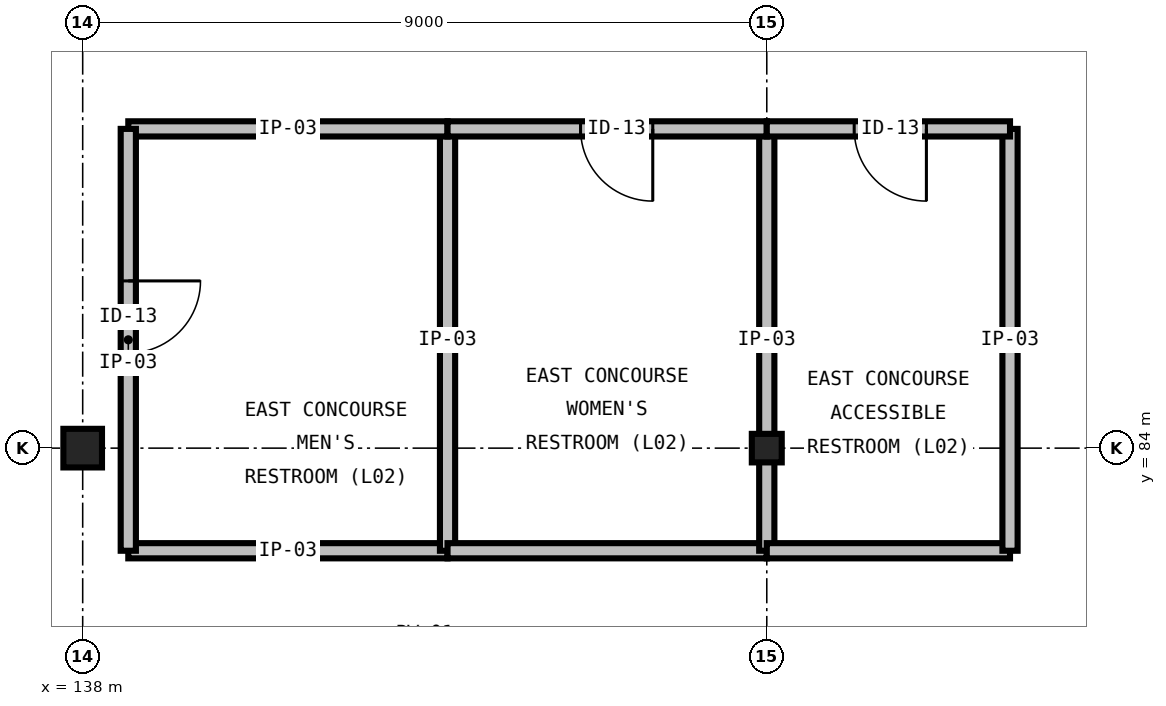
"""IFC4 building model, lengths in metres.
Left out: names, types, materials, properties, quantities, classifications, styles, units other than length and angle.
Written with IfcOpenShell. Run it as: python <this file> out.ifc"""

import sys

from ifc_helpers import new_model, si_unit, direction, frame, frame_2d, origin, origin_2d, place, context, subcontext, project, spatial, rectangle, hollow_rectangle, i_section, extrude, element, fill, save


model = new_model("IFC4")
c1 = context("Model", 3, precision=1e-05, world=origin(), true_north=direction((0.0, 1.0)))
c2 = subcontext(c1, "Body", "Model", "MODEL_VIEW")
j1 = project(units=[si_unit("LENGTHUNIT", "METRE"), si_unit("PLANEANGLEUNIT", "RADIAN")], contexts=[c1])
p1 = place(None, origin())
s1 = spatial("IfcSite", under=j1, at=p1, CompositionType="ELEMENT")
p2 = place(p1, origin())
s2 = spatial("IfcBuilding", under=s1, at=p2, CompositionType="ELEMENT")
p3 = place(p2, frame((0.0, 0.0, 12.0)))
s3 = spatial("IfcBuildingStorey", under=s2, at=p3, CompositionType="ELEMENT", Elevation=12.0)
p4 = place(p3, frame((138.0, 84.0, 0.0), z_axis=(0.0, 0.0, 1.0), x_axis=(1.0, 0.0, 0.0)))
e1 = element("IfcColumn", 1, at=p4, inside=s3, PredefinedType="COLUMN", context=c2, shape_type="SweptSolid", body=[
    extrude(hollow_rectangle(XDim=0.508, YDim=0.508, WallThickness=0.015, at=origin_2d()), origin(), (0.0, 0.0, 1.0), 6.0),
])
p5 = place(p3, frame((147.0, 84.0, 0.0), z_axis=(0.0, 0.0, 1.0), x_axis=(1.0, 0.0, 0.0)))
e2 = element("IfcColumn", 2, at=p5, inside=s3, PredefinedType="COLUMN", context=c2, shape_type="SweptSolid", body=[
    extrude(i_section(OverallWidth=0.394, OverallDepth=0.375, WebThickness=0.017, FlangeThickness=0.028, FilletRadius=0.031, at=origin_2d()), origin(), (0.0, 0.0, 1.0), 6.0),
])
p6 = place(p3, frame((138.6, 82.65, 0.0), z_axis=(0.0, 0.0, 1.0), x_axis=(1.0, 0.0, 0.0)))
e3 = element("IfcWall", 3, at=p6, inside=s3, PredefinedType="PARTITIONING", context=c2, shape_type="SweptSolid", body=[
    extrude(rectangle(XDim=4.2, YDim=0.2, at=frame_2d((2.1, 0.0))), origin(), (0.0, 0.0, 1.0), 5.65),
])
p7 = place(p3, frame((142.8, 82.65, 0.0), z_axis=(0.0, 0.0, 1.0), x_axis=(0.0, 1.0, 0.0)))
e4 = element("IfcWall", 4, at=p7, inside=s3, PredefinedType="PARTITIONING", context=c2, shape_type="SweptSolid", body=[
    extrude(rectangle(XDim=5.55, YDim=0.2, at=frame_2d((2.775, 0.0))), origin(), (0.0, 0.0, 1.0), 5.65),
])
p8 = place(p3, frame((142.8, 88.2, 0.0), z_axis=(0.0, 0.0, 1.0), x_axis=(-1.0, 0.0, 0.0)))
e5 = element("IfcWall", 5, at=p8, inside=s3, PredefinedType="PARTITIONING", context=c2, shape_type="SweptSolid", body=[
    extrude(rectangle(XDim=4.2, YDim=0.2, at=frame_2d((2.1, 0.0))), origin(), (0.0, 0.0, 1.0), 5.65),
])
p9 = place(p3, frame((138.6, 88.2, 0.0), z_axis=(0.0, 0.0, 1.0), x_axis=(0.0, -1.0, 0.0)))
e6 = element("IfcWall", 6, at=p9, inside=s3, PredefinedType="PARTITIONING", context=c2, shape_type="SweptSolid", body=[
    extrude(rectangle(XDim=5.55, YDim=0.2, at=frame_2d((2.775, 0.0))), origin(), (0.0, 0.0, 1.0), 5.65),
])
p10 = place(p9, frame((2.0, 0.0, 0.0)))
e7 = element("IfcOpeningElement", 7, at=p10, cuts=e6, PredefinedType="OPENING", context=c2, shape_type="SweptSolid", body=[
    extrude(rectangle(XDim=0.95, YDim=2.15, at=frame_2d((0.475, 1.075))), frame((0.0, 0.115, 0.0), z_axis=(0.0, -1.0, 0.0), x_axis=(1.0, 0.0, 0.0)), (0.0, 0.0, 1.0), 0.23),
])
p11 = place(p3, frame((142.8, 82.65, 0.0), z_axis=(0.0, 0.0, 1.0), x_axis=(1.0, 0.0, 0.0)))
e8 = element("IfcWall", 8, at=p11, inside=s3, PredefinedType="PARTITIONING", context=c2, shape_type="SweptSolid", body=[
    extrude(rectangle(XDim=4.2, YDim=0.2, at=frame_2d((2.1, 0.0))), origin(), (0.0, 0.0, 1.0), 5.65),
])
p12 = place(p3, frame((147.0, 82.65, 0.0), z_axis=(0.0, 0.0, 1.0), x_axis=(0.0, 1.0, 0.0)))
e9 = element("IfcWall", 9, at=p12, inside=s3, PredefinedType="PARTITIONING", context=c2, shape_type="SweptSolid", body=[
    extrude(rectangle(XDim=5.55, YDim=0.2, at=frame_2d((2.775, 0.0))), origin(), (0.0, 0.0, 1.0), 4.8),
])
p13 = place(p3, frame((147.0, 88.2, 0.0), z_axis=(0.0, 0.0, 1.0), x_axis=(-1.0, 0.0, 0.0)))
e10 = element("IfcWall", 10, at=p13, inside=s3, PredefinedType="PARTITIONING", context=c2, shape_type="SweptSolid", body=[
    extrude(rectangle(XDim=4.2, YDim=0.2, at=frame_2d((2.1, 0.0))), origin(), (0.0, 0.0, 1.0), 5.65),
])
p14 = place(p13, frame((1.5, 0.0, 0.0)))
e11 = element("IfcOpeningElement", 11, at=p14, cuts=e10, PredefinedType="OPENING", context=c2, shape_type="SweptSolid", body=[
    extrude(rectangle(XDim=0.95, YDim=2.15, at=frame_2d((0.475, 1.075))), frame((0.0, 0.115, 0.0), z_axis=(0.0, -1.0, 0.0), x_axis=(1.0, 0.0, 0.0)), (0.0, 0.0, 1.0), 0.23),
])
p15 = place(p3, frame((147.0, 82.65, 0.0), z_axis=(0.0, 0.0, 1.0), x_axis=(1.0, 0.0, 0.0)))
e12 = element("IfcWall", 12, at=p15, inside=s3, PredefinedType="PARTITIONING", context=c2, shape_type="SweptSolid", body=[
    extrude(rectangle(XDim=3.2, YDim=0.2, at=frame_2d((1.6, 0.0))), origin(), (0.0, 0.0, 1.0), 5.65),
])
p16 = place(p3, frame((150.2, 82.65, 0.0), z_axis=(0.0, 0.0, 1.0), x_axis=(0.0, 1.0, 0.0)))
e13 = element("IfcWall", 13, at=p16, inside=s3, PredefinedType="PARTITIONING", context=c2, shape_type="SweptSolid", body=[
    extrude(rectangle(XDim=5.55, YDim=0.2, at=frame_2d((2.775, 0.0))), origin(), (0.0, 0.0, 1.0), 5.65),
])
p17 = place(p3, frame((150.2, 88.2, 0.0), z_axis=(0.0, 0.0, 1.0), x_axis=(-1.0, 0.0, 0.0)))
e14 = element("IfcWall", 14, at=p17, inside=s3, PredefinedType="PARTITIONING", context=c2, shape_type="SweptSolid", body=[
    extrude(rectangle(XDim=3.2, YDim=0.2, at=frame_2d((1.6, 0.0))), origin(), (0.0, 0.0, 1.0), 5.65),
])
p18 = place(p17, frame((1.1, 0.0, 0.0)))
e15 = element("IfcOpeningElement", 15, at=p18, cuts=e14, PredefinedType="OPENING", context=c2, shape_type="SweptSolid", body=[
    extrude(rectangle(XDim=0.95, YDim=2.15, at=frame_2d((0.475, 1.075))), frame((0.0, 0.115, 0.0), z_axis=(0.0, -1.0, 0.0), x_axis=(1.0, 0.0, 0.0)), (0.0, 0.0, 1.0), 0.23),
])
p19 = place(p10, origin())
e16 = element("IfcDoor", 16, at=p19, inside=s3, OperationType="SINGLE_SWING_LEFT", PredefinedType="DOOR", context=c2, shape_type="SweptSolid", body=[
    extrude(rectangle(XDim=0.95, YDim=2.15, at=frame_2d((0.475, 1.075))), frame((0.0, 0.025, 0.0), z_axis=(0.0, -1.0, 0.0), x_axis=(1.0, 0.0, 0.0)), (0.0, 0.0, 1.0), 0.05),
])
fill(e7, e16)
p20 = place(p14, origin())
e17 = element("IfcDoor", 17, at=p20, inside=s3, OperationType="SINGLE_SWING_LEFT", PredefinedType="DOOR", context=c2, shape_type="SweptSolid", body=[
    extrude(rectangle(XDim=0.95, YDim=2.15, at=frame_2d((0.475, 1.075))), frame((0.0, 0.025, 0.0), z_axis=(0.0, -1.0, 0.0), x_axis=(1.0, 0.0, 0.0)), (0.0, 0.0, 1.0), 0.05),
])
fill(e11, e17)
p21 = place(p18, origin())
e18 = element("IfcDoor", 18, at=p21, inside=s3, OperationType="SINGLE_SWING_LEFT", PredefinedType="DOOR", context=c2, shape_type="SweptSolid", body=[
    extrude(rectangle(XDim=0.95, YDim=2.15, at=frame_2d((0.475, 1.075))), frame((0.0, 0.025, 0.0), z_axis=(0.0, -1.0, 0.0), x_axis=(1.0, 0.0, 0.0)), (0.0, 0.0, 1.0), 0.05),
])
fill(e15, e18)
save(model, sys.argv[1])
